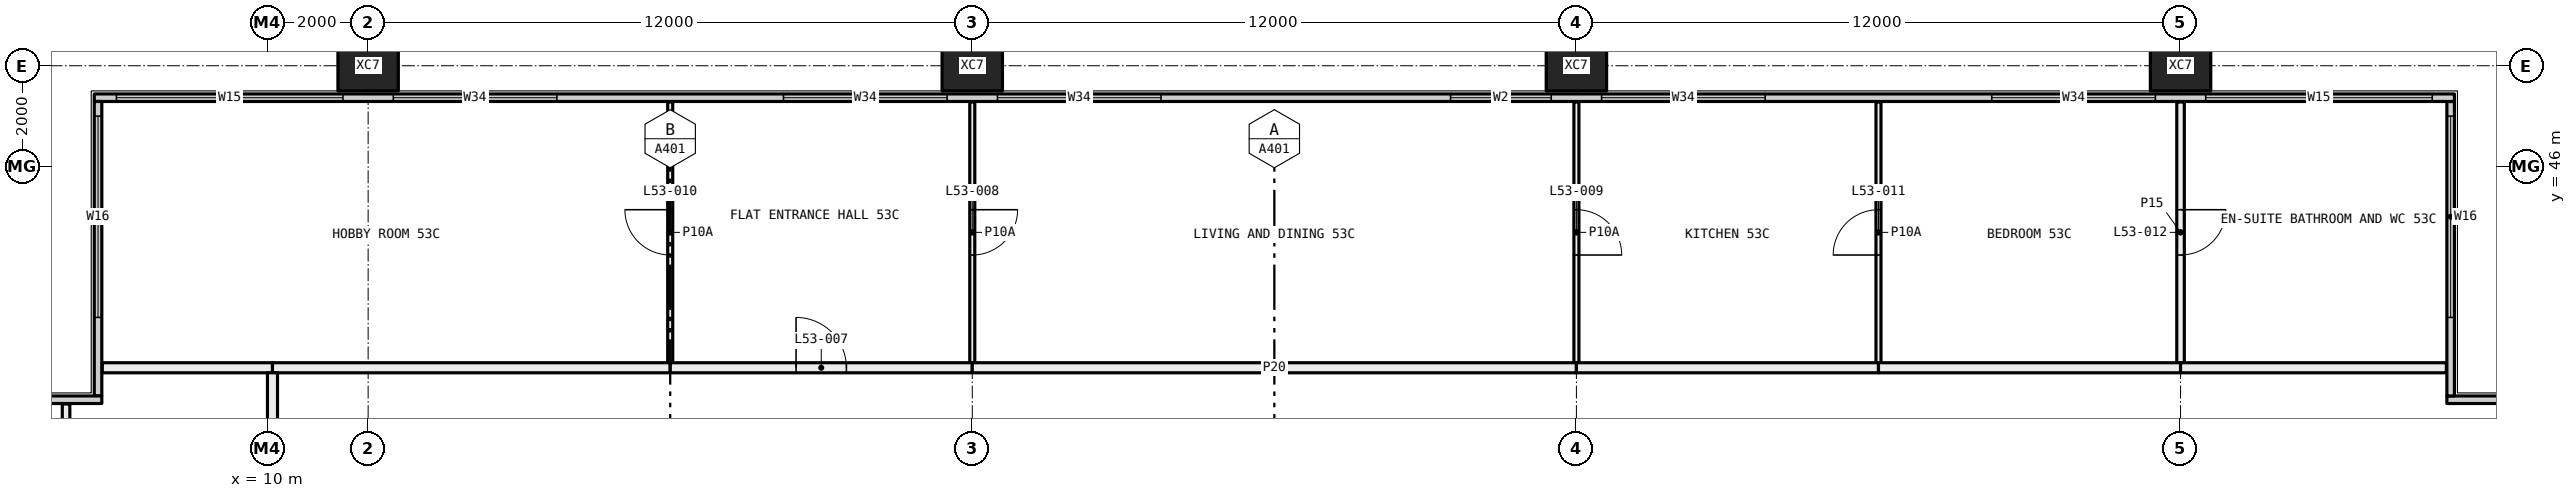
"""IFC4 building model, lengths in metres.
Left out: names, types, materials, properties, quantities, classifications, styles, units other than length and angle.
Written with IfcOpenShell. Run it as: python <this file> out.ifc"""

import sys

from ifc_helpers import new_model, si_unit, direction, frame, frame_2d, origin, origin_2d, place, context, subcontext, project, spatial, rectangle, hollow_rectangle, extrude, element, fill, save


model = new_model("IFC4")
c1 = context("Model", 3, precision=1e-05, world=origin(), true_north=direction((0.0, 1.0)))
c2 = subcontext(c1, "Body", "Model", "MODEL_VIEW")
j1 = project(units=[si_unit("LENGTHUNIT", "METRE"), si_unit("PLANEANGLEUNIT", "RADIAN")], contexts=[c1])
p1 = place(None, origin())
s1 = spatial("IfcSite", under=j1, at=p1, CompositionType="ELEMENT")
p2 = place(p1, origin())
s2 = spatial("IfcBuilding", under=s1, at=p2, CompositionType="ELEMENT")
p3 = place(p2, frame((0.0, 0.0, 199.65)))
s3 = spatial("IfcBuildingStorey", under=s2, at=p3, CompositionType="ELEMENT", Elevation=199.65)
for number, where, z_axis, x_axis in (
    (1, (12.0, 48.0, -0.4), (0.0, 0.0, 1.0), (1.0, 0.0, 0.0)),
    (2, (24.0, 48.0, -0.4), (0.0, 0.0, 1.0), (1.0, 0.0, 0.0)),
    (3, (36.0, 48.0, -0.4), (0.0, 0.0, 1.0), (1.0, 0.0, 0.0)),
    (4, (48.0, 48.0, -0.4), (0.0, 0.0, 1.0), (1.0, 0.0, 0.0)),
):
    element("IfcColumn", number, at=place(p3, frame(where, z_axis=z_axis, x_axis=x_axis)), inside=s3, PredefinedType="COLUMN", context=c2, shape_type="SweptSolid", body=[
        extrude(hollow_rectangle(XDim=1.2, YDim=1.0, WallThickness=0.045, at=origin_2d()), origin(), (0.0, 0.0, 1.0), 3.45),
    ])
p4 = place(p3, frame((53.29, 41.365, 0.0), z_axis=(0.0, 0.0, 1.0), x_axis=(1.0, 0.0, 0.0)))
e5 = element("IfcWall", 5, at=p4, inside=s3, PredefinedType="ELEMENTEDWALL", context=c2, shape_type="SweptSolid", body=[
    extrude(rectangle(XDim=6.15, YDim=0.15, at=frame_2d((3.075, 0.0))), origin(), (0.0, 0.0, 1.0), 3.05),
])
p5 = place(p4, frame((1.71, 0.0, 0.45)))
e6 = element("IfcOpeningElement", 6, at=p5, cuts=e5, PredefinedType="OPENING", context=c2, shape_type="SweptSolid", body=[
    extrude(rectangle(XDim=4.0, YDim=2.55, at=frame_2d((2.0, 1.275))), frame((0.0, 0.085, 0.0), z_axis=(0.0, -1.0, 0.0), x_axis=(1.0, 0.0, 0.0)), (0.0, 0.0, 1.0), 0.17),
])
p6 = place(p3, frame((53.365, 41.44, 0.0), z_axis=(0.0, 0.0, 1.0), x_axis=(0.0, 1.0, 0.0)))
e7 = element("IfcWall", 7, at=p6, inside=s3, PredefinedType="ELEMENTEDWALL", context=c2, shape_type="SweptSolid", body=[
    extrude(rectangle(XDim=5.85, YDim=0.15, at=frame_2d((2.925, 0.0))), origin(), (0.0, 0.0, 1.0), 3.05),
])
p7 = place(p6, frame((1.56, 0.0, 0.45)))
e8 = element("IfcOpeningElement", 8, at=p7, cuts=e7, PredefinedType="OPENING", context=c2, shape_type="SweptSolid", body=[
    extrude(rectangle(XDim=4.0, YDim=2.55, at=frame_2d((2.0, 1.275))), frame((0.0, 0.085, 0.0), z_axis=(0.0, -1.0, 0.0), x_axis=(1.0, 0.0, 0.0)), (0.0, 0.0, 1.0), 0.17),
])
p8 = place(p3, frame((6.56, 47.365, 0.0), z_axis=(0.0, 0.0, 1.0), x_axis=(1.0, 0.0, 0.0)))
e9 = element("IfcWall", 9, at=p8, inside=s3, PredefinedType="ELEMENTEDWALL", context=c2, shape_type="SweptSolid", body=[
    extrude(rectangle(XDim=46.88, YDim=0.15, at=frame_2d((23.44, 0.0))), origin(), (0.0, 0.0, 1.0), 3.05),
])
p9 = place(p8, frame((0.44, 0.0, 0.45)))
e10 = element("IfcOpeningElement", 10, at=p9, cuts=e9, PredefinedType="OPENING", context=c2, shape_type="SweptSolid", body=[
    extrude(rectangle(XDim=4.5, YDim=2.55, at=frame_2d((2.25, 1.275))), frame((0.0, 0.085, 0.0), z_axis=(0.0, -1.0, 0.0), x_axis=(1.0, 0.0, 0.0)), (0.0, 0.0, 1.0), 0.17),
])
p10 = place(p8, frame((5.94, 0.0, 0.45)))
e11 = element("IfcOpeningElement", 11, at=p10, cuts=e9, PredefinedType="OPENING", context=c2, shape_type="SweptSolid", body=[
    extrude(rectangle(XDim=3.25, YDim=2.55, at=frame_2d((1.625, 1.275))), frame((0.0, 0.085, 0.0), z_axis=(0.0, -1.0, 0.0), x_axis=(1.0, 0.0, 0.0)), (0.0, 0.0, 1.0), 0.17),
])
p11 = place(p8, frame((13.69, 0.0, 0.45)))
e12 = element("IfcOpeningElement", 12, at=p11, cuts=e9, PredefinedType="OPENING", context=c2, shape_type="SweptSolid", body=[
    extrude(rectangle(XDim=3.25, YDim=2.55, at=frame_2d((1.625, 1.275))), frame((0.0, 0.085, 0.0), z_axis=(0.0, -1.0, 0.0), x_axis=(1.0, 0.0, 0.0)), (0.0, 0.0, 1.0), 0.17),
])
p12 = place(p8, frame((17.94, 0.0, 0.45)))
e13 = element("IfcOpeningElement", 13, at=p12, cuts=e9, PredefinedType="OPENING", context=c2, shape_type="SweptSolid", body=[
    extrude(rectangle(XDim=3.25, YDim=2.55, at=frame_2d((1.625, 1.275))), frame((0.0, 0.085, 0.0), z_axis=(0.0, -1.0, 0.0), x_axis=(1.0, 0.0, 0.0)), (0.0, 0.0, 1.0), 0.17),
])
p13 = place(p8, frame((26.94, 0.0, 0.45)))
e14 = element("IfcOpeningElement", 14, at=p13, cuts=e9, PredefinedType="OPENING", context=c2, shape_type="SweptSolid", body=[
    extrude(rectangle(XDim=2.0, YDim=2.55, at=frame_2d((1.0, 1.275))), frame((0.0, 0.085, 0.0), z_axis=(0.0, -1.0, 0.0), x_axis=(1.0, 0.0, 0.0)), (0.0, 0.0, 1.0), 0.17),
])
p14 = place(p8, frame((29.94, 0.0, 0.45)))
e15 = element("IfcOpeningElement", 15, at=p14, cuts=e9, PredefinedType="OPENING", context=c2, shape_type="SweptSolid", body=[
    extrude(rectangle(XDim=3.25, YDim=2.55, at=frame_2d((1.625, 1.275))), frame((0.0, 0.085, 0.0), z_axis=(0.0, -1.0, 0.0), x_axis=(1.0, 0.0, 0.0)), (0.0, 0.0, 1.0), 0.17),
])
p15 = place(p8, frame((37.69, 0.0, 0.45)))
e16 = element("IfcOpeningElement", 16, at=p15, cuts=e9, PredefinedType="OPENING", context=c2, shape_type="SweptSolid", body=[
    extrude(rectangle(XDim=3.25, YDim=2.55, at=frame_2d((1.625, 1.275))), frame((0.0, 0.085, 0.0), z_axis=(0.0, -1.0, 0.0), x_axis=(1.0, 0.0, 0.0)), (0.0, 0.0, 1.0), 0.17),
])
p16 = place(p8, frame((41.94, 0.0, 0.45)))
e17 = element("IfcOpeningElement", 17, at=p16, cuts=e9, PredefinedType="OPENING", context=c2, shape_type="SweptSolid", body=[
    extrude(rectangle(XDim=4.5, YDim=2.55, at=frame_2d((2.25, 1.275))), frame((0.0, 0.085, 0.0), z_axis=(0.0, -1.0, 0.0), x_axis=(1.0, 0.0, 0.0)), (0.0, 0.0, 1.0), 0.17),
])
p17 = place(p3, frame((6.635, 41.44, 0.0), z_axis=(0.0, 0.0, 1.0), x_axis=(0.0, 1.0, 0.0)))
e18 = element("IfcWall", 18, at=p17, inside=s3, PredefinedType="ELEMENTEDWALL", context=c2, shape_type="SweptSolid", body=[
    extrude(rectangle(XDim=5.85, YDim=0.15, at=frame_2d((2.925, 0.0))), origin(), (0.0, 0.0, 1.0), 3.05),
])
p18 = place(p17, frame((1.56, 0.0, 0.45)))
e19 = element("IfcOpeningElement", 19, at=p18, cuts=e18, PredefinedType="OPENING", context=c2, shape_type="SweptSolid", body=[
    extrude(rectangle(XDim=4.0, YDim=2.55, at=frame_2d((2.0, 1.275))), frame((0.0, 0.085, 0.0), z_axis=(0.0, -1.0, 0.0), x_axis=(1.0, 0.0, 0.0)), (0.0, 0.0, 1.0), 0.17),
])
p19 = place(p3, frame((0.56, 41.365, 0.0), z_axis=(0.0, 0.0, 1.0), x_axis=(1.0, 0.0, 0.0)))
e20 = element("IfcWall", 20, at=p19, inside=s3, PredefinedType="ELEMENTEDWALL", context=c2, shape_type="SweptSolid", body=[
    extrude(rectangle(XDim=6.15, YDim=0.15, at=frame_2d((3.075, 0.0))), origin(), (0.0, 0.0, 1.0), 3.05),
])
p20 = place(p19, frame((0.44, 0.0, 0.45)))
e21 = element("IfcOpeningElement", 21, at=p20, cuts=e20, PredefinedType="OPENING", context=c2, shape_type="SweptSolid", body=[
    extrude(rectangle(XDim=4.0, YDim=2.55, at=frame_2d((2.0, 1.275))), frame((0.0, 0.085, 0.0), z_axis=(0.0, -1.0, 0.0), x_axis=(1.0, 0.0, 0.0)), (0.0, 0.0, 1.0), 0.17),
])
p21 = place(p3, frame((18.0, 42.1, 0.0), z_axis=(0.0, 0.0, 1.0), x_axis=(0.0, 1.0, 0.0)))
e22 = element("IfcWall", 22, at=p21, inside=s3, PredefinedType="PARTITIONING", context=c2, shape_type="SweptSolid", body=[
    extrude(rectangle(XDim=5.18, YDim=0.1, at=frame_2d((2.59, 0.0))), origin(), (0.0, 0.0, 1.0), 3.05),
])
p22 = place(p21, frame((2.14, 0.0, 0.0)))
e23 = element("IfcOpeningElement", 23, at=p22, cuts=e22, PredefinedType="OPENING", context=c2, shape_type="SweptSolid", body=[
    extrude(rectangle(XDim=0.9, YDim=2.1, at=frame_2d((0.45, 1.05))), frame((0.0, 0.06, 0.0), z_axis=(0.0, -1.0, 0.0), x_axis=(1.0, 0.0, 0.0)), (0.0, 0.0, 1.0), 0.12),
])
p23 = place(p3, frame((6.72, 42.0, 0.0), z_axis=(0.0, 0.0, 1.0), x_axis=(1.0, 0.0, 0.0)))
e24 = element("IfcWall", 24, at=p23, inside=s3, PredefinedType="PARTITIONING", context=c2, shape_type="SweptSolid", body=[
    extrude(rectangle(XDim=3.38, YDim=0.2, at=frame_2d((1.69, 0.0))), origin(), (0.0, 0.0, 1.0), 3.05),
])
p24 = place(p3, frame((10.1, 42.0, 0.0), z_axis=(0.0, 0.0, 1.0), x_axis=(1.0, 0.0, 0.0)))
e25 = element("IfcWall", 25, at=p24, inside=s3, PredefinedType="PARTITIONING", context=c2, shape_type="SweptSolid", body=[
    extrude(rectangle(XDim=7.9, YDim=0.2, at=frame_2d((3.95, 0.0))), origin(), (0.0, 0.0, 1.0), 3.05),
])
p25 = place(p3, frame((24.0, 42.1, 0.0), z_axis=(0.0, 0.0, 1.0), x_axis=(0.0, 1.0, 0.0)))
e26 = element("IfcWall", 26, at=p25, inside=s3, PredefinedType="PARTITIONING", context=c2, shape_type="SweptSolid", body=[
    extrude(rectangle(XDim=5.18, YDim=0.1, at=frame_2d((2.59, 0.0))), origin(), (0.0, 0.0, 1.0), 3.05),
])
p26 = place(p25, frame((2.14, 0.0, 0.0)))
e27 = element("IfcOpeningElement", 27, at=p26, cuts=e26, PredefinedType="OPENING", context=c2, shape_type="SweptSolid", body=[
    extrude(rectangle(XDim=0.9, YDim=2.1, at=frame_2d((0.45, 1.05))), frame((0.0, 0.06, 0.0), z_axis=(0.0, -1.0, 0.0), x_axis=(1.0, 0.0, 0.0)), (0.0, 0.0, 1.0), 0.12),
])
p27 = place(p3, frame((18.0, 42.0, 0.0), z_axis=(0.0, 0.0, 1.0), x_axis=(1.0, 0.0, 0.0)))
e28 = element("IfcWall", 28, at=p27, inside=s3, PredefinedType="PARTITIONING", context=c2, shape_type="SweptSolid", body=[
    extrude(rectangle(XDim=6.0, YDim=0.2, at=frame_2d((3.0, 0.0))), origin(), (0.0, 0.0, 1.0), 3.05),
])
p28 = place(p27, frame((2.5, 0.0, 0.0)))
e29 = element("IfcOpeningElement", 29, at=p28, cuts=e28, PredefinedType="OPENING", context=c2, shape_type="SweptSolid", body=[
    extrude(rectangle(XDim=1.0, YDim=2.1, at=frame_2d((0.5, 1.05))), frame((0.0, 0.11, 0.0), z_axis=(0.0, -1.0, 0.0), x_axis=(1.0, 0.0, 0.0)), (0.0, 0.0, 1.0), 0.22),
])
p29 = place(p3, frame((36.0, 42.1, 0.0), z_axis=(0.0, 0.0, 1.0), x_axis=(0.0, 1.0, 0.0)))
e30 = element("IfcWall", 30, at=p29, inside=s3, PredefinedType="PARTITIONING", context=c2, shape_type="SweptSolid", body=[
    extrude(rectangle(XDim=5.18, YDim=0.1, at=frame_2d((2.59, 0.0))), origin(), (0.0, 0.0, 1.0), 2.45),
])
p30 = place(p29, frame((2.14, 0.0, 0.0)))
e31 = element("IfcOpeningElement", 31, at=p30, cuts=e30, PredefinedType="OPENING", context=c2, shape_type="SweptSolid", body=[
    extrude(rectangle(XDim=0.9, YDim=2.1, at=frame_2d((0.45, 1.05))), frame((0.0, 0.06, 0.0), z_axis=(0.0, -1.0, 0.0), x_axis=(1.0, 0.0, 0.0)), (0.0, 0.0, 1.0), 0.12),
])
p31 = place(p3, frame((24.0, 42.0, 0.0), z_axis=(0.0, 0.0, 1.0), x_axis=(1.0, 0.0, 0.0)))
e32 = element("IfcWall", 32, at=p31, inside=s3, PredefinedType="PARTITIONING", context=c2, shape_type="SweptSolid", body=[
    extrude(rectangle(XDim=12.0, YDim=0.2, at=frame_2d((6.0, 0.0))), origin(), (0.0, 0.0, 1.0), 2.45),
])
p32 = place(p3, frame((42.0, 42.1, 0.0), z_axis=(0.0, 0.0, 1.0), x_axis=(0.0, 1.0, 0.0)))
e33 = element("IfcWall", 33, at=p32, inside=s3, PredefinedType="PARTITIONING", context=c2, shape_type="SweptSolid", body=[
    extrude(rectangle(XDim=5.18, YDim=0.1, at=frame_2d((2.59, 0.0))), origin(), (0.0, 0.0, 1.0), 3.05),
])
p33 = place(p32, frame((2.14, 0.0, 0.0)))
e34 = element("IfcOpeningElement", 34, at=p33, cuts=e33, PredefinedType="OPENING", context=c2, shape_type="SweptSolid", body=[
    extrude(rectangle(XDim=0.9, YDim=2.1, at=frame_2d((0.45, 1.05))), frame((0.0, 0.06, 0.0), z_axis=(0.0, -1.0, 0.0), x_axis=(1.0, 0.0, 0.0)), (0.0, 0.0, 1.0), 0.12),
])
p34 = place(p3, frame((36.0, 42.0, 0.0), z_axis=(0.0, 0.0, 1.0), x_axis=(1.0, 0.0, 0.0)))
e35 = element("IfcWall", 35, at=p34, inside=s3, PredefinedType="PARTITIONING", context=c2, shape_type="SweptSolid", body=[
    extrude(rectangle(XDim=6.0, YDim=0.2, at=frame_2d((3.0, 0.0))), origin(), (0.0, 0.0, 1.0), 2.45),
])
p35 = place(p3, frame((48.0, 42.1, 0.0), z_axis=(0.0, 0.0, 1.0), x_axis=(0.0, 1.0, 0.0)))
e36 = element("IfcWall", 36, at=p35, inside=s3, PredefinedType="PARTITIONING", context=c2, shape_type="SweptSolid", body=[
    extrude(rectangle(XDim=5.18, YDim=0.15, at=frame_2d((2.59, 0.0))), origin(), (0.0, 0.0, 1.0), 3.05),
])
p36 = place(p35, frame((2.14, 0.0, 0.0)))
e37 = element("IfcOpeningElement", 37, at=p36, cuts=e36, PredefinedType="OPENING", context=c2, shape_type="SweptSolid", body=[
    extrude(rectangle(XDim=0.9, YDim=2.1, at=frame_2d((0.45, 1.05))), frame((0.0, 0.085, 0.0), z_axis=(0.0, -1.0, 0.0), x_axis=(1.0, 0.0, 0.0)), (0.0, 0.0, 1.0), 0.17),
])
p37 = place(p3, frame((42.0, 42.0, 0.0), z_axis=(0.0, 0.0, 1.0), x_axis=(1.0, 0.0, 0.0)))
e38 = element("IfcWall", 38, at=p37, inside=s3, PredefinedType="PARTITIONING", context=c2, shape_type="SweptSolid", body=[
    extrude(rectangle(XDim=6.0, YDim=0.2, at=frame_2d((3.0, 0.0))), origin(), (0.0, 0.0, 1.0), 3.05),
])
p38 = place(p3, frame((48.0, 42.0, 0.0), z_axis=(0.0, 0.0, 1.0), x_axis=(1.0, 0.0, 0.0)))
e39 = element("IfcWall", 39, at=p38, inside=s3, PredefinedType="PARTITIONING", context=c2, shape_type="SweptSolid", body=[
    extrude(rectangle(XDim=5.28, YDim=0.2, at=frame_2d((2.64, 0.0))), origin(), (0.0, 0.0, 1.0), 3.05),
])
p39 = place(p3, frame((6.0, 37.5, 0.0), z_axis=(0.0, 0.0, 1.0), x_axis=(0.0, 1.0, 0.0)))
e40 = element("IfcWall", 40, at=p39, inside=s3, PredefinedType="PARTITIONING", context=c2, shape_type="SweptSolid", body=[
    extrude(rectangle(XDim=3.78, YDim=0.15, at=frame_2d((1.89, 0.0))), origin(), (0.0, 0.0, 1.0), 3.05),
])
p40 = place(p3, frame((10.1, 37.5, 0.0), z_axis=(0.0, 0.0, 1.0), x_axis=(0.0, 1.0, 0.0)))
e41 = element("IfcWall", 41, at=p40, inside=s3, PredefinedType="PARTITIONING", context=c2, shape_type="SweptSolid", body=[
    extrude(rectangle(XDim=4.4, YDim=0.2, at=frame_2d((2.2, 0.0))), origin(), (0.0, 0.0, 1.0), 3.05),
])
p41 = place(p7, origin())
e42 = element("IfcWindow", 42, at=p41, inside=s3, PartitioningType="SINGLE_PANEL", PredefinedType="WINDOW", context=c2, shape_type="SweptSolid", body=[
    extrude(rectangle(XDim=4.0, YDim=2.55, at=frame_2d((2.0, 1.275))), frame((0.0, 0.03, 0.0), z_axis=(0.0, -1.0, 0.0), x_axis=(1.0, 0.0, 0.0)), (0.0, 0.0, 1.0), 0.06),
])
fill(e8, e42)
p42 = place(p9, origin())
e43 = element("IfcWindow", 43, at=p42, inside=s3, PartitioningType="SINGLE_PANEL", PredefinedType="WINDOW", context=c2, shape_type="SweptSolid", body=[
    extrude(rectangle(XDim=4.5, YDim=2.55, at=frame_2d((2.25, 1.275))), frame((0.0, 0.03, 0.0), z_axis=(0.0, -1.0, 0.0), x_axis=(1.0, 0.0, 0.0)), (0.0, 0.0, 1.0), 0.06),
])
fill(e10, e43)
p43 = place(p10, origin())
e44 = element("IfcWindow", 44, at=p43, inside=s3, PartitioningType="SINGLE_PANEL", PredefinedType="WINDOW", context=c2, shape_type="SweptSolid", body=[
    extrude(rectangle(XDim=3.25, YDim=2.55, at=frame_2d((1.625, 1.275))), frame((0.0, 0.03, 0.0), z_axis=(0.0, -1.0, 0.0), x_axis=(1.0, 0.0, 0.0)), (0.0, 0.0, 1.0), 0.06),
])
fill(e11, e44)
p44 = place(p11, origin())
e45 = element("IfcWindow", 45, at=p44, inside=s3, PartitioningType="SINGLE_PANEL", PredefinedType="WINDOW", context=c2, shape_type="SweptSolid", body=[
    extrude(rectangle(XDim=3.25, YDim=2.55, at=frame_2d((1.625, 1.275))), frame((0.0, 0.03, 0.0), z_axis=(0.0, -1.0, 0.0), x_axis=(1.0, 0.0, 0.0)), (0.0, 0.0, 1.0), 0.06),
])
fill(e12, e45)
p45 = place(p12, origin())
e46 = element("IfcWindow", 46, at=p45, inside=s3, PartitioningType="SINGLE_PANEL", PredefinedType="WINDOW", context=c2, shape_type="SweptSolid", body=[
    extrude(rectangle(XDim=3.25, YDim=2.55, at=frame_2d((1.625, 1.275))), frame((0.0, 0.03, 0.0), z_axis=(0.0, -1.0, 0.0), x_axis=(1.0, 0.0, 0.0)), (0.0, 0.0, 1.0), 0.06),
])
fill(e13, e46)
p46 = place(p13, origin())
e47 = element("IfcWindow", 47, at=p46, inside=s3, PartitioningType="SINGLE_PANEL", PredefinedType="WINDOW", context=c2, shape_type="SweptSolid", body=[
    extrude(rectangle(XDim=2.0, YDim=2.55, at=frame_2d((1.0, 1.275))), frame((0.0, 0.03, 0.0), z_axis=(0.0, -1.0, 0.0), x_axis=(1.0, 0.0, 0.0)), (0.0, 0.0, 1.0), 0.06),
])
fill(e14, e47)
p47 = place(p14, origin())
e48 = element("IfcWindow", 48, at=p47, inside=s3, PartitioningType="SINGLE_PANEL", PredefinedType="WINDOW", context=c2, shape_type="SweptSolid", body=[
    extrude(rectangle(XDim=3.25, YDim=2.55, at=frame_2d((1.625, 1.275))), frame((0.0, 0.03, 0.0), z_axis=(0.0, -1.0, 0.0), x_axis=(1.0, 0.0, 0.0)), (0.0, 0.0, 1.0), 0.06),
])
fill(e15, e48)
p48 = place(p15, origin())
e49 = element("IfcWindow", 49, at=p48, inside=s3, PartitioningType="SINGLE_PANEL", PredefinedType="WINDOW", context=c2, shape_type="SweptSolid", body=[
    extrude(rectangle(XDim=3.25, YDim=2.55, at=frame_2d((1.625, 1.275))), frame((0.0, 0.03, 0.0), z_axis=(0.0, -1.0, 0.0), x_axis=(1.0, 0.0, 0.0)), (0.0, 0.0, 1.0), 0.06),
])
fill(e16, e49)
p49 = place(p16, origin())
e50 = element("IfcWindow", 50, at=p49, inside=s3, PartitioningType="SINGLE_PANEL", PredefinedType="WINDOW", context=c2, shape_type="SweptSolid", body=[
    extrude(rectangle(XDim=4.5, YDim=2.55, at=frame_2d((2.25, 1.275))), frame((0.0, 0.03, 0.0), z_axis=(0.0, -1.0, 0.0), x_axis=(1.0, 0.0, 0.0)), (0.0, 0.0, 1.0), 0.06),
])
fill(e17, e50)
p50 = place(p18, origin())
e51 = element("IfcWindow", 51, at=p50, inside=s3, PartitioningType="SINGLE_PANEL", PredefinedType="WINDOW", context=c2, shape_type="SweptSolid", body=[
    extrude(rectangle(XDim=4.0, YDim=2.55, at=frame_2d((2.0, 1.275))), frame((0.0, 0.03, 0.0), z_axis=(0.0, -1.0, 0.0), x_axis=(1.0, 0.0, 0.0)), (0.0, 0.0, 1.0), 0.06),
])
fill(e19, e51)
p51 = place(p28, origin())
e52 = element("IfcDoor", 52, at=p51, inside=s3, OperationType="SINGLE_SWING_RIGHT", PredefinedType="DOOR", context=c2, shape_type="SweptSolid", body=[
    extrude(rectangle(XDim=1.0, YDim=2.1, at=frame_2d((0.5, 1.05))), frame((0.0, 0.025, 0.0), z_axis=(0.0, -1.0, 0.0), x_axis=(1.0, 0.0, 0.0)), (0.0, 0.0, 1.0), 0.05),
])
fill(e29, e52)
p52 = place(p26, frame((0.9, 0.0, 0.0), x_axis=(-1.0, 0.0, 0.0)))
e53 = element("IfcDoor", 53, at=p52, inside=s3, OperationType="SINGLE_SWING_RIGHT", PredefinedType="DOOR", context=c2, shape_type="SweptSolid", body=[
    extrude(rectangle(XDim=0.9, YDim=2.1, at=frame_2d((0.45, 1.05))), frame((0.0, 0.025, 0.0), z_axis=(0.0, -1.0, 0.0), x_axis=(1.0, 0.0, 0.0)), (0.0, 0.0, 1.0), 0.05),
])
fill(e27, e53)
p53 = place(p30, frame((0.9, 0.0, 0.0), x_axis=(-1.0, 0.0, 0.0)))
e54 = element("IfcDoor", 54, at=p53, inside=s3, OperationType="SINGLE_SWING_LEFT", PredefinedType="DOOR", context=c2, shape_type="SweptSolid", body=[
    extrude(rectangle(XDim=0.9, YDim=2.1, at=frame_2d((0.45, 1.05))), frame((0.0, 0.025, 0.0), z_axis=(0.0, -1.0, 0.0), x_axis=(1.0, 0.0, 0.0)), (0.0, 0.0, 1.0), 0.05),
])
fill(e31, e54)
p54 = place(p22, origin())
e55 = element("IfcDoor", 55, at=p54, inside=s3, OperationType="SINGLE_SWING_LEFT", PredefinedType="DOOR", context=c2, shape_type="SweptSolid", body=[
    extrude(rectangle(XDim=0.9, YDim=2.1, at=frame_2d((0.45, 1.05))), frame((0.0, 0.025, 0.0), z_axis=(0.0, -1.0, 0.0), x_axis=(1.0, 0.0, 0.0)), (0.0, 0.0, 1.0), 0.05),
])
fill(e23, e55)
p55 = place(p33, origin())
e56 = element("IfcDoor", 56, at=p55, inside=s3, OperationType="SINGLE_SWING_RIGHT", PredefinedType="DOOR", context=c2, shape_type="SweptSolid", body=[
    extrude(rectangle(XDim=0.9, YDim=2.1, at=frame_2d((0.45, 1.05))), frame((0.0, 0.025, 0.0), z_axis=(0.0, -1.0, 0.0), x_axis=(1.0, 0.0, 0.0)), (0.0, 0.0, 1.0), 0.05),
])
fill(e34, e56)
p56 = place(p36, frame((0.9, 0.0, 0.0), x_axis=(-1.0, 0.0, 0.0)))
e57 = element("IfcDoor", 57, at=p56, inside=s3, OperationType="SINGLE_SWING_RIGHT", PredefinedType="DOOR", context=c2, shape_type="SweptSolid", body=[
    extrude(rectangle(XDim=0.9, YDim=2.1, at=frame_2d((0.45, 1.05))), frame((0.0, 0.025, 0.0), z_axis=(0.0, -1.0, 0.0), x_axis=(1.0, 0.0, 0.0)), (0.0, 0.0, 1.0), 0.05),
])
fill(e37, e57)
save(model, sys.argv[1])
